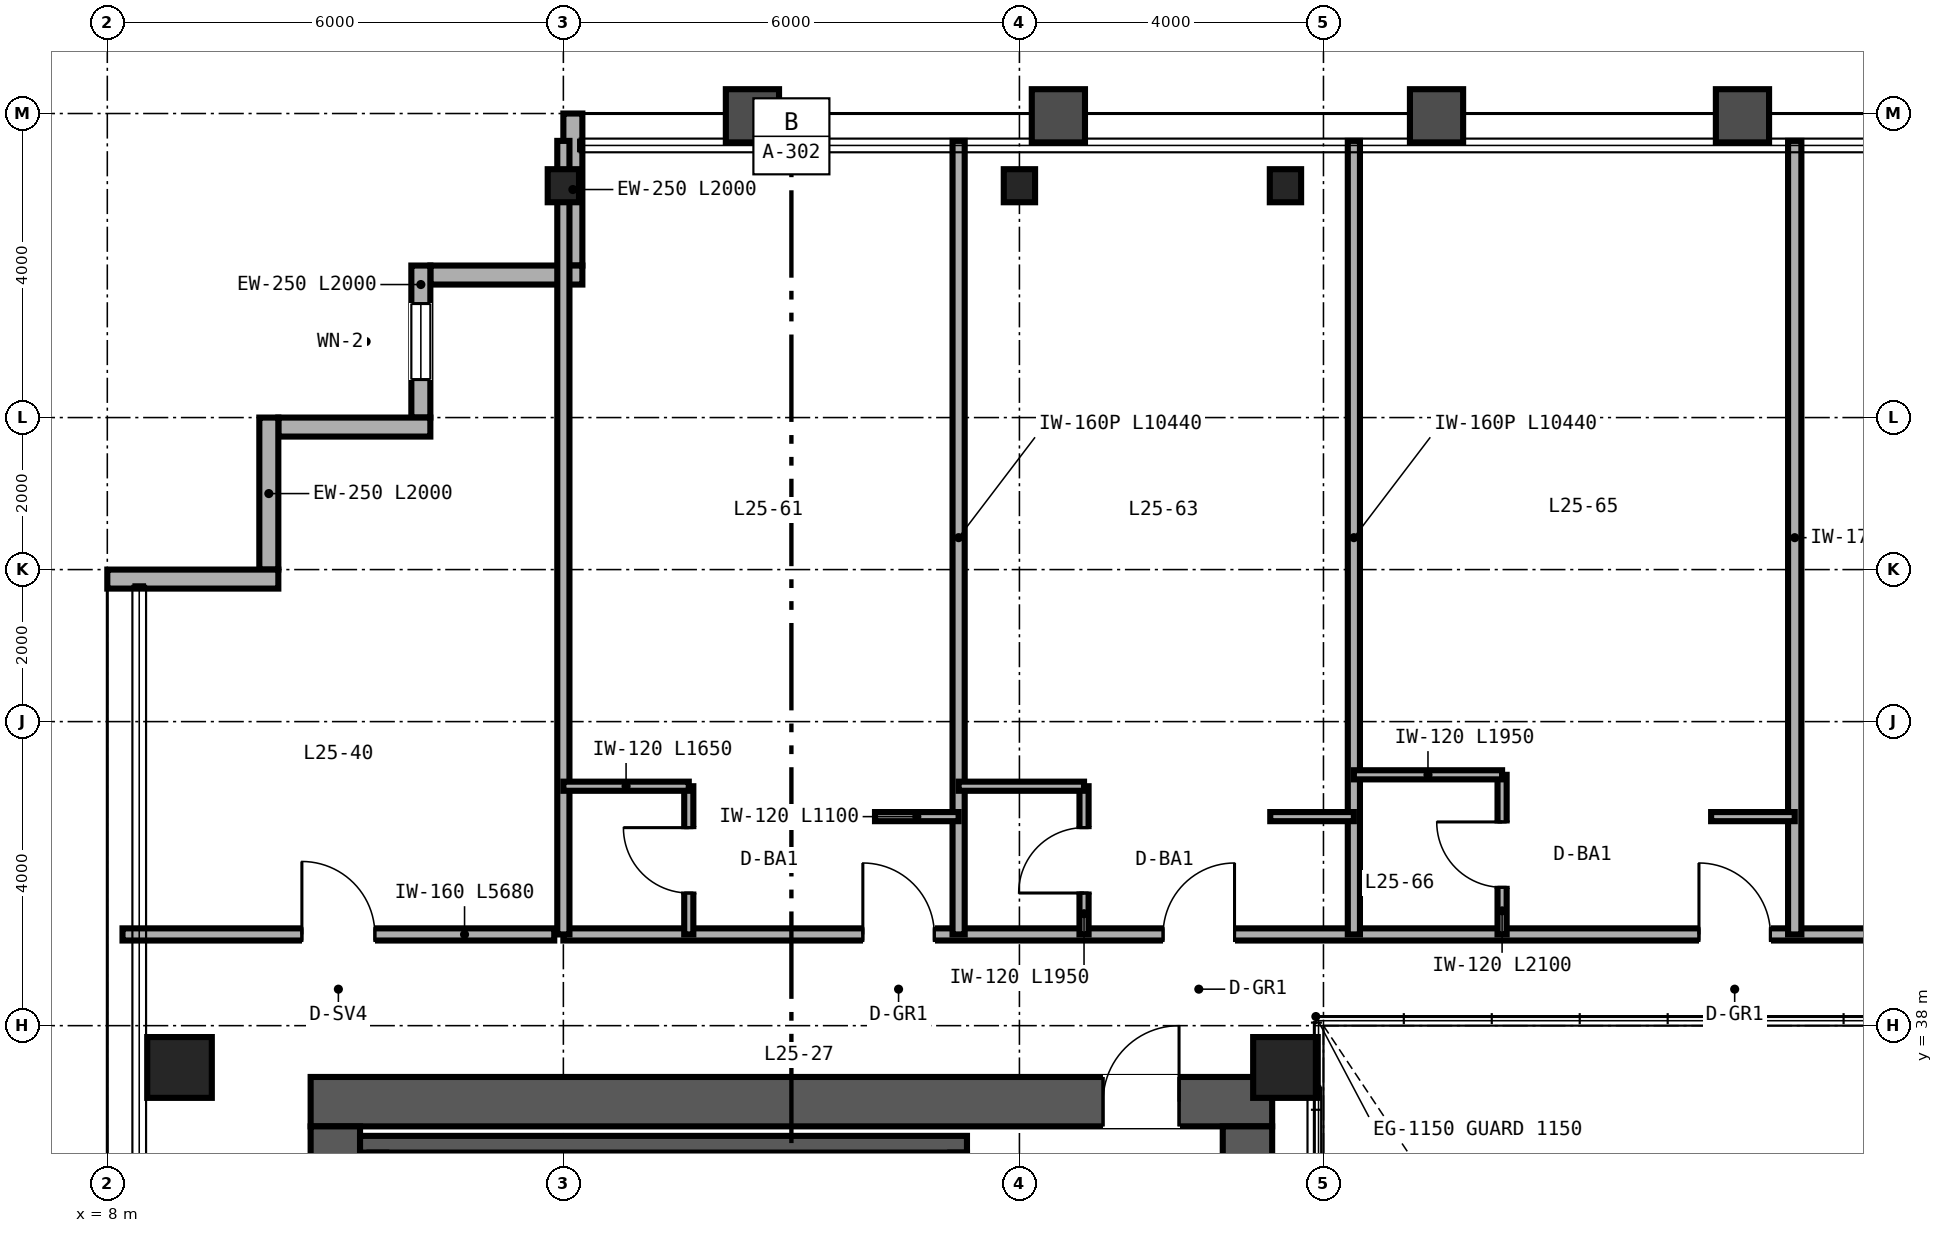
"""IFC4 building model, lengths in metres.
Left out: names, types, materials, properties, quantities, classifications, styles, units other than length and angle.
Written with IfcOpenShell. Run it as: python <this file> out.ifc"""

import sys

from ifc_helpers import new_model, si_unit, direction, frame, frame_2d, origin, origin_2d, place, context, subcontext, project, spatial, rectangle, hollow_rectangle, i_section, extrude, source, transform, mapped, element, fill, save


model = new_model("IFC4")
c1 = context("Model", 3, precision=1e-05, world=origin(), true_north=direction((0.0, 1.0)))
c2 = subcontext(c1, "Body", "Model", "MODEL_VIEW")
j1 = project(units=[si_unit("LENGTHUNIT", "METRE"), si_unit("PLANEANGLEUNIT", "RADIAN")], contexts=[c1])
p1 = place(None, origin())
s1 = spatial("IfcSite", under=j1, at=p1, CompositionType="ELEMENT")
p2 = place(p1, origin())
s2 = spatial("IfcBuilding", under=s1, at=p2, CompositionType="ELEMENT")
p3 = place(p2, frame((0.0, 0.0, 104.4)))
s3 = spatial("IfcBuildingStorey", under=s2, at=p3, CompositionType="ELEMENT", Elevation=104.4)
p4 = place(p3, frame((10.675, 37.0, 0.0), z_axis=(0.0, 0.0, 1.0), x_axis=(1.0, 0.0, 0.0)))
e1 = element("IfcWall", 1, at=p4, inside=s3, PredefinedType="SHEAR", context=c2, shape_type="SweptSolid", body=[
    extrude(rectangle(XDim=12.65, YDim=0.65, at=frame_2d((6.325, 0.0))), origin(), (0.0, 0.0, 1.0), 3.36),
])
p5 = place(p4, frame((10.425, 0.0, 0.0)))
e2 = element("IfcOpeningElement", 2, at=p5, cuts=e1, PredefinedType="OPENING", context=c2, shape_type="SweptSolid", body=[
    extrude(rectangle(XDim=1.0, YDim=2.15, at=frame_2d((0.5, 1.075))), frame((0.0, 0.335, 0.0), z_axis=(0.0, -1.0, 0.0), x_axis=(1.0, 0.0, 0.0)), (0.0, 0.0, 1.0), 0.67),
])
for number, where, z_axis, x_axis in (
    (3, (11.0, 15.325, 0.0), (0.0, 0.0, 1.0), (0.0, 1.0, 0.0)),
    (4, (23.0, 15.325, 0.0), (0.0, 0.0, 1.0), (0.0, 1.0, 0.0)),
):
    element("IfcWall", number, at=place(p3, frame(where, z_axis=z_axis, x_axis=x_axis)), inside=s3, PredefinedType="SHEAR", context=c2, shape_type="SweptSolid", body=[
        extrude(rectangle(XDim=21.35, YDim=0.65, at=frame_2d((10.675, 0.0))), origin(), (0.0, 0.0, 1.0), 3.36),
    ])
p6 = place(p3, frame((11.325, 36.44, 0.0), z_axis=(0.0, 0.0, 1.0), x_axis=(1.0, 0.0, 0.0)))
e5 = element("IfcWall", 5, at=p6, inside=s3, PredefinedType="SHEAR", context=c2, shape_type="SweptSolid", body=[
    extrude(rectangle(XDim=7.985, YDim=0.22, at=frame_2d((3.993, 0.0))), origin(), (0.0, 0.0, 1.0), 3.4),
])
for number, where, z_axis, x_axis in (
    (6, (11.56, 33.05, 0.0), (0.0, 0.0, 1.0), (0.0, 1.0, 0.0)),
    (7, (19.2, 33.05, 0.0), (0.0, 0.0, 1.0), (0.0, 1.0, 0.0)),
):
    element("IfcWall", number, at=place(p3, frame(where, z_axis=z_axis, x_axis=x_axis)), inside=s3, PredefinedType="SHEAR", context=c2, shape_type="SweptSolid", body=[
        extrude(rectangle(XDim=3.28, YDim=0.22, at=frame_2d((1.64, 0.0))), origin(), (0.0, 0.0, 1.0), 3.4),
    ])
m1 = source(origin(), c2, "Body", "SweptSolid", [
    extrude(hollow_rectangle(XDim=0.85, YDim=0.8, WallThickness=0.032, at=origin_2d()), origin(), (0.0, 0.0, 1.0), 3.36),
])
for number, where, z_axis, x_axis in (
    (8, (8.95, 37.45, 0.0), (0.0, 0.0, 1.0), (1.0, 0.0, 0.0)),
    (9, (23.5, 37.45, 0.0), (0.0, 0.0, 1.0), (1.0, 0.0, 0.0)),
):
    element("IfcColumn", number, at=place(p3, frame(where, z_axis=z_axis, x_axis=x_axis)), inside=s3, PredefinedType="COLUMN", context=c2, shape_type="MappedRepresentation", body=[
        mapped(m1, transform((0.0, 0.0, 0.0), scale=1.0)),
    ])
m2 = source(origin(), c2, "Body", "SweptSolid", [
    extrude(i_section(OverallWidth=0.412, OverallDepth=0.435, WebThickness=0.036, FlangeThickness=0.057, FilletRadius=0.025, at=origin_2d()), origin(), (0.0, 0.0, 1.0), 3.36),
])
for number, where, z_axis, x_axis in (
    (10, (14.0, 49.05, 0.0), (0.0, 0.0, 1.0), (1.0, 0.0, 0.0)),
    (11, (20.0, 49.05, 0.0), (0.0, 0.0, 1.0), (1.0, 0.0, 0.0)),
    (12, (23.5, 49.05, 0.0), (0.0, 0.0, 1.0), (1.0, 0.0, 0.0)),
):
    element("IfcColumn", number, at=place(p3, frame(where, z_axis=z_axis, x_axis=x_axis)), inside=s3, PredefinedType="COLUMN", context=c2, shape_type="MappedRepresentation", body=[
        mapped(m2, transform((0.0, 0.0, 0.0), scale=1.0)),
    ])
p7 = place(p3, frame((14.125, 50.0, 0.0), z_axis=(0.0, 0.0, 1.0), x_axis=(0.0, -1.0, 0.0)))
e13 = element("IfcWall", 13, at=p7, inside=s3, PredefinedType="SOLIDWALL", context=c2, shape_type="SweptSolid", body=[
    extrude(rectangle(XDim=2.0, YDim=0.25, at=frame_2d((1.0, 0.0))), origin(), (0.0, 0.0, 1.0), 2.667),
])
p8 = place(p3, frame((14.25, 47.875, 0.0), z_axis=(0.0, 0.0, 1.0), x_axis=(-1.0, 0.0, 0.0)))
e14 = element("IfcWall", 14, at=p8, inside=s3, PredefinedType="SOLIDWALL", context=c2, shape_type="SweptSolid", body=[
    extrude(rectangle(XDim=2.0, YDim=0.25, at=frame_2d((1.0, 0.0))), origin(), (0.0, 0.0, 1.0), 3.36),
])
p9 = place(p3, frame((12.125, 48.0, 0.0), z_axis=(0.0, 0.0, 1.0), x_axis=(0.0, -1.0, 0.0)))
e15 = element("IfcWall", 15, at=p9, inside=s3, PredefinedType="SOLIDWALL", context=c2, shape_type="SweptSolid", body=[
    extrude(rectangle(XDim=2.0, YDim=0.25, at=frame_2d((1.0, 0.0))), origin(), (0.0, 0.0, 1.0), 3.36),
])
p10 = place(p9, frame((0.5, 0.0, 0.85)))
e16 = element("IfcOpeningElement", 16, at=p10, cuts=e15, PredefinedType="OPENING", context=c2, shape_type="SweptSolid", body=[
    extrude(rectangle(XDim=1.0, YDim=1.9, at=frame_2d((0.5, 0.95))), frame((0.0, 0.135, 0.0), z_axis=(0.0, -1.0, 0.0), x_axis=(1.0, 0.0, 0.0)), (0.0, 0.0, 1.0), 0.27),
])
for number, where, z_axis, x_axis in (
    (17, (12.25, 45.875, 0.0), (0.0, 0.0, 1.0), (-1.0, 0.0, 0.0)),
    (18, (10.125, 46.0, 0.0), (0.0, 0.0, 1.0), (0.0, -1.0, 0.0)),
):
    element("IfcWall", number, at=place(p3, frame(where, z_axis=z_axis, x_axis=x_axis)), inside=s3, PredefinedType="SOLIDWALL", context=c2, shape_type="SweptSolid", body=[
        extrude(rectangle(XDim=2.0, YDim=0.25, at=frame_2d((1.0, 0.0))), origin(), (0.0, 0.0, 1.0), 3.36),
    ])
p11 = place(p3, frame((10.25, 43.875, 0.0), z_axis=(0.0, 0.0, 1.0), x_axis=(-1.0, 0.0, 0.0)))
e19 = element("IfcWall", 19, at=p11, inside=s3, PredefinedType="SOLIDWALL", context=c2, shape_type="SweptSolid", body=[
    extrude(rectangle(XDim=2.25, YDim=0.25, at=frame_2d((1.125, 0.0))), origin(), (0.0, 0.0, 1.0), 3.36),
])
p12 = place(p3, frame((8.2, 39.2, 0.0), z_axis=(0.0, 0.0, 1.0), x_axis=(1.0, 0.0, 0.0)))
e20 = element("IfcWall", 20, at=p12, inside=s3, PredefinedType="PARTITIONING", context=c2, shape_type="SweptSolid", body=[
    extrude(rectangle(XDim=5.68, YDim=0.16, at=frame_2d((2.84, 0.0))), origin(), (0.0, 0.0, 1.0), 3.36),
])
p13 = place(p12, frame((2.36, 0.0, 0.0)))
e21 = element("IfcOpeningElement", 21, at=p13, cuts=e20, PredefinedType="OPENING", context=c2, shape_type="SweptSolid", body=[
    extrude(rectangle(XDim=0.96, YDim=2.15, at=frame_2d((0.48, 1.075))), frame((0.0, 0.09, 0.0), z_axis=(0.0, -1.0, 0.0), x_axis=(1.0, 0.0, 0.0)), (0.0, 0.0, 1.0), 0.18),
])
p14 = place(p3, frame((14.0, 39.2, 0.0), z_axis=(0.0, 0.0, 1.0), x_axis=(1.0, 0.0, 0.0)))
e22 = element("IfcWall", 22, at=p14, inside=s3, PredefinedType="PARTITIONING", context=c2, shape_type="SweptSolid", body=[
    extrude(rectangle(XDim=36.0, YDim=0.16, at=frame_2d((18.0, 0.0))), origin(), (0.0, 0.0, 1.0), 2.581),
])
p15 = place(p14, frame((3.94, 0.0, 0.0)))
e23 = element("IfcOpeningElement", 23, at=p15, cuts=e22, PredefinedType="OPENING", context=c2, shape_type="SweptSolid", body=[
    extrude(rectangle(XDim=0.94, YDim=2.15, at=frame_2d((0.47, 1.075))), frame((0.0, 0.09, 0.0), z_axis=(0.0, -1.0, 0.0), x_axis=(1.0, 0.0, 0.0)), (0.0, 0.0, 1.0), 0.18),
])
p16 = place(p14, frame((7.89, 0.0, 0.0)))
e24 = element("IfcOpeningElement", 24, at=p16, cuts=e22, PredefinedType="OPENING", context=c2, shape_type="SweptSolid", body=[
    extrude(rectangle(XDim=0.94, YDim=2.15, at=frame_2d((0.47, 1.075))), frame((0.0, 0.09, 0.0), z_axis=(0.0, -1.0, 0.0), x_axis=(1.0, 0.0, 0.0)), (0.0, 0.0, 1.0), 0.18),
])
p17 = place(p14, frame((14.94, 0.0, 0.0)))
e25 = element("IfcOpeningElement", 25, at=p17, cuts=e22, PredefinedType="OPENING", context=c2, shape_type="SweptSolid", body=[
    extrude(rectangle(XDim=0.94, YDim=2.15, at=frame_2d((0.47, 1.075))), frame((0.0, 0.09, 0.0), z_axis=(0.0, -1.0, 0.0), x_axis=(1.0, 0.0, 0.0)), (0.0, 0.0, 1.0), 0.18),
])
p18 = place(p14, frame((18.72, 0.0, 0.0)))
e26 = element("IfcOpeningElement", 26, at=p18, cuts=e22, PredefinedType="OPENING", context=c2, shape_type="SweptSolid", body=[
    extrude(rectangle(XDim=0.96, YDim=2.15, at=frame_2d((0.48, 1.075))), frame((0.0, 0.09, 0.0), z_axis=(0.0, -1.0, 0.0), x_axis=(1.0, 0.0, 0.0)), (0.0, 0.0, 1.0), 0.18),
])
p19 = place(p14, frame((24.79, 0.0, 0.0)))
e27 = element("IfcOpeningElement", 27, at=p19, cuts=e22, PredefinedType="OPENING", context=c2, shape_type="SweptSolid", body=[
    extrude(rectangle(XDim=0.94, YDim=2.15, at=frame_2d((0.47, 1.075))), frame((0.0, 0.09, 0.0), z_axis=(0.0, -1.0, 0.0), x_axis=(1.0, 0.0, 0.0)), (0.0, 0.0, 1.0), 0.18),
])
p20 = place(p14, frame((30.34, 0.0, 0.0)))
e28 = element("IfcOpeningElement", 28, at=p20, cuts=e22, PredefinedType="OPENING", context=c2, shape_type="SweptSolid", body=[
    extrude(rectangle(XDim=0.94, YDim=2.15, at=frame_2d((0.47, 1.075))), frame((0.0, 0.09, 0.0), z_axis=(0.0, -1.0, 0.0), x_axis=(1.0, 0.0, 0.0)), (0.0, 0.0, 1.0), 0.18),
])
p21 = place(p14, frame((34.74, 0.0, 0.0)))
e29 = element("IfcOpeningElement", 29, at=p21, cuts=e22, PredefinedType="OPENING", context=c2, shape_type="SweptSolid", body=[
    extrude(rectangle(XDim=0.94, YDim=2.15, at=frame_2d((0.47, 1.075))), frame((0.0, 0.09, 0.0), z_axis=(0.0, -1.0, 0.0), x_axis=(1.0, 0.0, 0.0)), (0.0, 0.0, 1.0), 0.18),
])
for number, where, z_axis, x_axis in (
    (30, (14.0, 39.2, 0.0), (0.0, 0.0, 1.0), (0.0, 1.0, 0.0)),
    (31, (19.2, 39.2, 0.0), (0.0, 0.0, 1.0), (0.0, 1.0, 0.0)),
):
    element("IfcWall", number, at=place(p3, frame(where, z_axis=z_axis, x_axis=x_axis)), inside=s3, PredefinedType="PARTITIONING", context=c2, shape_type="SweptSolid", body=[
        extrude(rectangle(XDim=10.44, YDim=0.16, at=frame_2d((5.22, 0.0))), origin(), (0.0, 0.0, 1.0), 2.667),
    ])
p22 = place(p3, frame((15.65, 39.2, 0.0), z_axis=(0.0, 0.0, 1.0), x_axis=(0.0, 1.0, 0.0)))
e32 = element("IfcWall", 32, at=p22, inside=s3, PredefinedType="PARTITIONING", context=c2, shape_type="SweptSolid", body=[
    extrude(rectangle(XDim=1.95, YDim=0.12, at=frame_2d((0.975, 0.0))), origin(), (0.0, 0.0, 1.0), 3.36),
])
p23 = place(p22, frame((0.545, 0.0, 0.0)))
e33 = element("IfcOpeningElement", 33, at=p23, cuts=e32, PredefinedType="OPENING", context=c2, shape_type="SweptSolid", body=[
    extrude(rectangle(XDim=0.86, YDim=2.1, at=frame_2d((0.43, 1.05))), frame((0.0, 0.07, 0.0), z_axis=(0.0, -1.0, 0.0), x_axis=(1.0, 0.0, 0.0)), (0.0, 0.0, 1.0), 0.14),
])
p24 = place(p3, frame((14.0, 41.15, 0.0), z_axis=(0.0, 0.0, 1.0), x_axis=(1.0, 0.0, 0.0)))
e34 = element("IfcWall", 34, at=p24, inside=s3, PredefinedType="PARTITIONING", context=c2, shape_type="SweptSolid", body=[
    extrude(rectangle(XDim=1.65, YDim=0.12, at=frame_2d((0.825, 0.0))), origin(), (0.0, 0.0, 1.0), 3.36),
])
p25 = place(p3, frame((18.1, 40.75, 0.0), z_axis=(0.0, 0.0, 1.0), x_axis=(1.0, 0.0, 0.0)))
e35 = element("IfcWall", 35, at=p25, inside=s3, PredefinedType="PARTITIONING", context=c2, shape_type="SweptSolid", body=[
    extrude(rectangle(XDim=1.1, YDim=0.12, at=frame_2d((0.55, 0.0))), origin(), (0.0, 0.0, 1.0), 3.36),
])
p26 = place(p3, frame((24.4, 39.2, 0.0), z_axis=(0.0, 0.0, 1.0), x_axis=(0.0, 1.0, 0.0)))
e36 = element("IfcWall", 36, at=p26, inside=s3, PredefinedType="PARTITIONING", context=c2, shape_type="SweptSolid", body=[
    extrude(rectangle(XDim=10.44, YDim=0.16, at=frame_2d((5.22, 0.0))), origin(), (0.0, 0.0, 1.0), 2.433),
])
p27 = place(p3, frame((20.85, 39.2, 0.0), z_axis=(0.0, 0.0, 1.0), x_axis=(0.0, 1.0, 0.0)))
e37 = element("IfcWall", 37, at=p27, inside=s3, PredefinedType="PARTITIONING", context=c2, shape_type="SweptSolid", body=[
    extrude(rectangle(XDim=1.95, YDim=0.12, at=frame_2d((0.975, 0.0))), origin(), (0.0, 0.0, 1.0), 3.36),
])
p28 = place(p27, frame((0.545, 0.0, 0.0)))
e38 = element("IfcOpeningElement", 38, at=p28, cuts=e37, PredefinedType="OPENING", context=c2, shape_type="SweptSolid", body=[
    extrude(rectangle(XDim=0.86, YDim=2.1, at=frame_2d((0.43, 1.05))), frame((0.0, 0.07, 0.0), z_axis=(0.0, -1.0, 0.0), x_axis=(1.0, 0.0, 0.0)), (0.0, 0.0, 1.0), 0.14),
])
p29 = place(p3, frame((19.2, 41.15, 0.0), z_axis=(0.0, 0.0, 1.0), x_axis=(1.0, 0.0, 0.0)))
e39 = element("IfcWall", 39, at=p29, inside=s3, PredefinedType="PARTITIONING", context=c2, shape_type="SweptSolid", body=[
    extrude(rectangle(XDim=1.65, YDim=0.12, at=frame_2d((0.825, 0.0))), origin(), (0.0, 0.0, 1.0), 3.36),
])
p30 = place(p3, frame((23.3, 40.75, 0.0), z_axis=(0.0, 0.0, 1.0), x_axis=(1.0, 0.0, 0.0)))
e40 = element("IfcWall", 40, at=p30, inside=s3, PredefinedType="PARTITIONING", context=c2, shape_type="SweptSolid", body=[
    extrude(rectangle(XDim=1.1, YDim=0.12, at=frame_2d((0.55, 0.0))), origin(), (0.0, 0.0, 1.0), 2.581),
])
p31 = place(p3, frame((30.2, 39.2, 0.0), z_axis=(0.0, 0.0, 1.0), x_axis=(0.0, 1.0, 0.0)))
e41 = element("IfcWall", 41, at=p31, inside=s3, PredefinedType="PARTITIONING", context=c2, shape_type="SweptSolid", body=[
    extrude(rectangle(XDim=10.44, YDim=0.175, at=frame_2d((5.22, 0.0))), origin(), (0.0, 0.0, 1.0), 2.433),
])
p32 = place(p3, frame((26.35, 39.2, 0.0), z_axis=(0.0, 0.0, 1.0), x_axis=(0.0, 1.0, 0.0)))
e42 = element("IfcWall", 42, at=p32, inside=s3, PredefinedType="PARTITIONING", context=c2, shape_type="SweptSolid", body=[
    extrude(rectangle(XDim=2.1, YDim=0.12, at=frame_2d((1.05, 0.0))), origin(), (0.0, 0.0, 1.0), 3.36),
])
p33 = place(p32, frame((0.62, 0.0, 0.0)))
e43 = element("IfcOpeningElement", 43, at=p33, cuts=e42, PredefinedType="OPENING", context=c2, shape_type="SweptSolid", body=[
    extrude(rectangle(XDim=0.86, YDim=2.1, at=frame_2d((0.43, 1.05))), frame((0.0, 0.07, 0.0), z_axis=(0.0, -1.0, 0.0), x_axis=(1.0, 0.0, 0.0)), (0.0, 0.0, 1.0), 0.14),
])
p34 = place(p3, frame((24.4, 41.3, 0.0), z_axis=(0.0, 0.0, 1.0), x_axis=(1.0, 0.0, 0.0)))
e44 = element("IfcWall", 44, at=p34, inside=s3, PredefinedType="PARTITIONING", context=c2, shape_type="SweptSolid", body=[
    extrude(rectangle(XDim=1.95, YDim=0.12, at=frame_2d((0.975, 0.0))), origin(), (0.0, 0.0, 1.0), 3.36),
])
p35 = place(p3, frame((29.1, 40.75, 0.0), z_axis=(0.0, 0.0, 1.0), x_axis=(1.0, 0.0, 0.0)))
e45 = element("IfcWall", 45, at=p35, inside=s3, PredefinedType="PARTITIONING", context=c2, shape_type="SweptSolid", body=[
    extrude(rectangle(XDim=1.1, YDim=0.12, at=frame_2d((0.55, 0.0))), origin(), (0.0, 0.0, 1.0), 3.36),
])
m3 = source(origin(), c2, "Body", "SweptSolid", [
    extrude(rectangle(XDim=1.0, YDim=1.9, at=frame_2d((0.5, 0.95))), frame((0.0, 0.03, 0.0), z_axis=(0.0, -1.0, 0.0), x_axis=(1.0, 0.0, 0.0)), (0.0, 0.0, 1.0), 0.06),
])
p36 = place(p10, origin())
e46 = element("IfcWindow", 46, at=p36, inside=s3, PartitioningType="SINGLE_PANEL", PredefinedType="WINDOW", context=c2, shape_type="MappedRepresentation", body=[
    mapped(m3, transform((0.0, 0.0, 0.0), scale=1.0)),
])
fill(e16, e46)
m4 = source(origin(), c2, "Body", "SweptSolid", [
    extrude(rectangle(XDim=1.0, YDim=2.15, at=frame_2d((0.5, 1.075))), frame((0.0, 0.025, 0.0), z_axis=(0.0, -1.0, 0.0), x_axis=(1.0, 0.0, 0.0)), (0.0, 0.0, 1.0), 0.05),
])
p37 = place(p5, origin())
e47 = element("IfcDoor", 47, at=p37, inside=s3, OperationType="SINGLE_SWING_RIGHT", PredefinedType="DOOR", context=c2, shape_type="MappedRepresentation", body=[
    mapped(m4, transform((0.0, 0.0, 0.0), scale=1.0)),
])
fill(e2, e47)
m5 = source(origin(), c2, "Body", "SweptSolid", [
    extrude(rectangle(XDim=0.96, YDim=2.15, at=frame_2d((0.48, 1.075))), frame((0.0, 0.025, 0.0), z_axis=(0.0, -1.0, 0.0), x_axis=(1.0, 0.0, 0.0)), (0.0, 0.0, 1.0), 0.05),
])
p38 = place(p13, origin())
e48 = element("IfcDoor", 48, at=p38, inside=s3, OperationType="SINGLE_SWING_LEFT", PredefinedType="DOOR", context=c2, shape_type="MappedRepresentation", body=[
    mapped(m5, transform((0.0, 0.0, 0.0), scale=1.0)),
])
fill(e21, e48)
m6 = source(origin(), c2, "Body", "SweptSolid", [
    extrude(rectangle(XDim=0.86, YDim=2.1, at=frame_2d((0.43, 1.05))), frame((0.0, 0.025, 0.0), z_axis=(0.0, -1.0, 0.0), x_axis=(1.0, 0.0, 0.0)), (0.0, 0.0, 1.0), 0.05),
])
p39 = place(p23, origin())
e49 = element("IfcDoor", 49, at=p39, inside=s3, OperationType="SINGLE_SWING_RIGHT", PredefinedType="DOOR", context=c2, shape_type="MappedRepresentation", body=[
    mapped(m6, transform((0.0, 0.0, 0.0), scale=1.0)),
])
fill(e33, e49)
p40 = place(p28, origin())
e50 = element("IfcDoor", 50, at=p40, inside=s3, OperationType="SINGLE_SWING_LEFT", PredefinedType="DOOR", context=c2, shape_type="MappedRepresentation", body=[
    mapped(m6, transform((0.0, 0.0, 0.0), scale=1.0)),
])
fill(e38, e50)
p41 = place(p33, origin())
e51 = element("IfcDoor", 51, at=p41, inside=s3, OperationType="SINGLE_SWING_RIGHT", PredefinedType="DOOR", context=c2, shape_type="MappedRepresentation", body=[
    mapped(m6, transform((0.0, 0.0, 0.0), scale=1.0)),
])
fill(e43, e51)
m7 = source(origin(), c2, "Body", "SweptSolid", [
    extrude(rectangle(XDim=0.94, YDim=2.15, at=frame_2d((0.47, 1.075))), frame((0.0, 0.025, 0.0), z_axis=(0.0, -1.0, 0.0), x_axis=(1.0, 0.0, 0.0)), (0.0, 0.0, 1.0), 0.05),
])
p42 = place(p15, origin())
e52 = element("IfcDoor", 52, at=p42, inside=s3, OperationType="SINGLE_SWING_LEFT", PredefinedType="DOOR", context=c2, shape_type="MappedRepresentation", body=[
    mapped(m7, transform((0.0, 0.0, 0.0), scale=1.0)),
])
fill(e23, e52)
p43 = place(p16, origin())
e53 = element("IfcDoor", 53, at=p43, inside=s3, OperationType="SINGLE_SWING_RIGHT", PredefinedType="DOOR", context=c2, shape_type="MappedRepresentation", body=[
    mapped(m7, transform((0.0, 0.0, 0.0), scale=1.0)),
])
fill(e24, e53)
p44 = place(p17, origin())
e54 = element("IfcDoor", 54, at=p44, inside=s3, OperationType="SINGLE_SWING_LEFT", PredefinedType="DOOR", context=c2, shape_type="MappedRepresentation", body=[
    mapped(m7, transform((0.0, 0.0, 0.0), scale=1.0)),
])
fill(e25, e54)
save(model, sys.argv[1])
